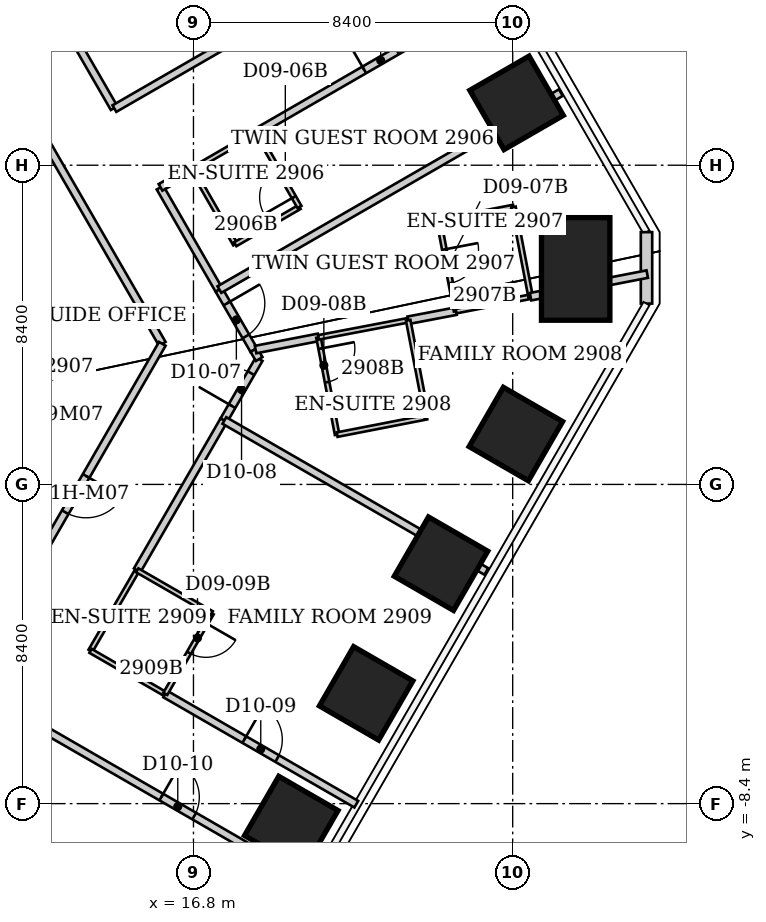
"""IFC4 building model, lengths in metres.
Left out: names, types, materials, properties, quantities, classifications, styles, units other than length and angle.
Written with IfcOpenShell. Run it as: python <this file> out.ifc"""

import sys

from ifc_helpers import new_model, si_unit, direction, frame, frame_2d, origin, origin_2d, place, context, subcontext, project, spatial, rectangle, extrude, element, fill, save


model = new_model("IFC4")
c1 = context("Model", 3, precision=1e-05, world=origin(), true_north=direction((0.0, 1.0)))
c2 = subcontext(c1, "Body", "Model", "MODEL_VIEW")
j1 = project(units=[si_unit("LENGTHUNIT", "METRE"), si_unit("PLANEANGLEUNIT", "RADIAN")], contexts=[c1])
p1 = place(None, origin())
s1 = spatial("IfcSite", under=j1, at=p1, CompositionType="ELEMENT")
p2 = place(p1, origin())
s2 = spatial("IfcBuilding", under=s1, at=p2, CompositionType="ELEMENT")
p3 = place(p2, frame((0.0, 0.0, 119.6)))
s3 = spatial("IfcBuildingStorey", under=s2, at=p3, CompositionType="ELEMENT", Elevation=119.6)
p4 = place(p3, frame((25.302, 10.041, 0.0), z_axis=(0.0, 0.0, 1.0), x_axis=(0.866025403784, 0.5, 0.0)))
e1 = element("IfcColumn", 1, at=p4, inside=s3, PredefinedType="COLUMN", context=c2, shape_type="SweptSolid", body=[
    extrude(rectangle(XDim=1.8, YDim=1.8, at=origin_2d()), origin(), (0.0, 0.0, 1.0), 3.8),
])
p5 = place(p3, frame((26.857, 5.67, 0.0), z_axis=(0.0, 0.0, 1.0), x_axis=(1.0, 0.0, 0.0)))
e2 = element("IfcColumn", 2, at=p5, inside=s3, PredefinedType="COLUMN", context=c2, shape_type="SweptSolid", body=[
    extrude(rectangle(XDim=1.8, YDim=2.7, at=origin_2d()), origin(), (0.0, 0.0, 1.0), 3.8),
])
for number, where, z_axis, x_axis in (
    (3, (25.284, 1.325, 0.0), (0.0, 0.0, 1.0), (0.866, -0.5, 0.0)),
    (4, (23.314, -2.087, 0.0), (0.0, 0.0, 1.0), (0.866, -0.5, 0.0)),
    (5, (21.344, -5.499, 0.0), (0.0, 0.0, 1.0), (0.866, -0.5, 0.0)),
    (6, (19.374, -8.911, 0.0), (0.0, 0.0, 1.0), (0.866, -0.5, 0.0)),
):
    element("IfcColumn", number, at=place(p3, frame(where, z_axis=z_axis, x_axis=x_axis)), inside=s3, PredefinedType="COLUMN", context=c2, shape_type="SweptSolid", body=[
        extrude(rectangle(XDim=1.8, YDim=1.8, at=origin_2d()), origin(), (0.0, 0.0, 1.0), 3.8),
    ])
p6 = place(p3, frame((28.721, 6.638, 0.0), z_axis=(0.0, 0.0, 1.0), x_axis=(0.0, -1.0, 0.0)))
e7 = element("IfcWall", 7, at=p6, inside=s3, PredefinedType="SOLIDWALL", context=c2, shape_type="SweptSolid", body=[
    extrude(rectangle(XDim=1.88, YDim=0.3, at=frame_2d((0.94, 0.0))), origin(), (0.0, 0.0, 1.0), 3.64),
])
p7 = place(p3, frame((11.77, 10.99, 0.0), z_axis=(0.0, 0.0, 1.0), x_axis=(0.500093981358, -0.865971136822, 0.0)))
e8 = element("IfcWall", 8, at=p7, inside=s3, PredefinedType="PARTITIONING", context=c2, shape_type="SweptSolid", body=[
    extrude(rectangle(XDim=8.418, YDim=0.2, at=frame_2d((4.209, 0.0))), origin(), (0.0, 0.0, 1.0), 3.64),
])
p8 = place(p3, frame((12.89, -6.46, 0.0), z_axis=(0.0, 0.0, 1.0), x_axis=(0.866181559118, -0.499729433437, 0.0)))
e9 = element("IfcWall", 9, at=p8, inside=s3, PredefinedType="PARTITIONING", context=c2, shape_type="SweptSolid", body=[
    extrude(rectangle(XDim=8.075, YDim=0.2, at=frame_2d((4.037, 0.0))), origin(), (0.0, 0.0, 1.0), 3.64),
])
p9 = place(p8, frame((3.537, 0.0, 0.0)))
e10 = element("IfcOpeningElement", 10, at=p9, cuts=e9, PredefinedType="OPENING", context=c2, shape_type="SweptSolid", body=[
    extrude(rectangle(XDim=1.0, YDim=2.13, at=frame_2d((0.5, 1.065))), frame((0.0, 0.1, 0.0), z_axis=(0.0, -1.0, 0.0), x_axis=(1.0, 0.0, 0.0)), (0.0, 0.0, 1.0), 0.2),
])
p10 = place(p3, frame((13.005, 12.86, 0.0), z_axis=(0.0, 0.0, 1.0), x_axis=(0.500007161152, -0.866021269252, 0.0)))
e11 = element("IfcWall", 11, at=p10, inside=s3, PredefinedType="PARTITIONING", context=c2, shape_type="SweptSolid", body=[
    extrude(rectangle(XDim=3.415, YDim=0.2, at=frame_2d((1.707, 0.0))), origin(), (0.0, 0.0, 1.0), 3.64),
])
p11 = place(p3, frame((14.09, -4.38, 0.0), z_axis=(0.0, 0.0, 1.0), x_axis=(0.501856726365, 0.86495076519, 0.0)))
e12 = element("IfcWall", 12, at=p11, inside=s3, PredefinedType="PARTITIONING", context=c2, shape_type="SweptSolid", body=[
    extrude(rectangle(XDim=2.451, YDim=0.12, at=frame_2d((1.226, 0.0))), origin(), (0.0, 0.0, 1.0), 3.64),
])
p12 = place(p3, frame((14.09, -4.38, 0.0), z_axis=(0.0, 0.0, 1.0), x_axis=(0.866151579213, -0.499781394038, 0.0)))
e13 = element("IfcWall", 13, at=p12, inside=s3, PredefinedType="PARTITIONING", context=c2, shape_type="SweptSolid", body=[
    extrude(rectangle(XDim=2.271, YDim=0.12, at=frame_2d((1.135, 0.0))), origin(), (0.0, 0.0, 1.0), 3.64),
])
p13 = place(p3, frame((15.32, -2.26, 0.0), z_axis=(0.0, 0.0, 1.0), x_axis=(0.499921709333, 0.866070600204, 0.0)))
e14 = element("IfcWall", 14, at=p13, inside=s3, PredefinedType="PARTITIONING", context=c2, shape_type="SweptSolid", body=[
    extrude(rectangle(XDim=4.561, YDim=0.2, at=frame_2d((2.28, 0.0))), origin(), (0.0, 0.0, 1.0), 3.64),
])
p14 = place(p3, frame((15.92, 7.81, 0.0), z_axis=(0.0, 0.0, 1.0), x_axis=(0.499277611559, -0.866442073422, 0.0)))
e15 = element("IfcWall", 15, at=p14, inside=s3, PredefinedType="PARTITIONING", context=c2, shape_type="SweptSolid", body=[
    extrude(rectangle(XDim=3.104, YDim=0.2, at=frame_2d((1.552, 0.0))), origin(), (0.0, 0.0, 1.0), 3.64),
])
p15 = place(p3, frame((15.933, 7.817, 0.0), z_axis=(0.0, 0.0, 1.0), x_axis=(0.870733094426, 0.491755913305, 0.0)))
e16 = element("IfcWall", 16, at=p15, inside=s3, PredefinedType="PARTITIONING", context=c2, shape_type="SweptSolid", body=[
    extrude(rectangle(XDim=0.961, YDim=0.2, at=frame_2d((0.48, 0.0))), origin(), (0.0, 0.0, 1.0), 3.64),
])
p16 = place(p3, frame((15.98, 3.7, 0.0), z_axis=(0.0, 0.0, 1.0), x_axis=(-0.499446957289, -0.866344467781, 0.0)))
e17 = element("IfcWall", 17, at=p16, inside=s3, PredefinedType="PARTITIONING", context=c2, shape_type="SweptSolid", body=[
    extrude(rectangle(XDim=9.13, YDim=0.2, at=frame_2d((4.565, 0.0))), origin(), (0.0, 0.0, 1.0), 3.64),
])
p17 = place(p16, frame((4.015, 0.0, 0.0)))
e18 = element("IfcOpeningElement", 18, at=p17, cuts=e17, PredefinedType="OPENING", context=c2, shape_type="SweptSolid", body=[
    extrude(rectangle(XDim=1.1, YDim=2.2, at=frame_2d((0.55, 1.1))), frame((0.0, 0.1, 0.0), z_axis=(0.0, -1.0, 0.0), x_axis=(1.0, 0.0, 0.0)), (0.0, 0.0, 1.0), 0.2),
])
p18 = place(p3, frame((16.057, -5.515, 0.0), z_axis=(0.0, 0.0, 1.0), x_axis=(0.866182784606, -0.499727309292, 0.0)))
e19 = element("IfcWall", 19, at=p18, inside=s3, PredefinedType="PARTITIONING", context=c2, shape_type="SweptSolid", body=[
    extrude(rectangle(XDim=5.803, YDim=0.2, at=frame_2d((2.902, 0.0))), origin(), (0.0, 0.0, 1.0), 3.64),
])
p19 = place(p18, frame((2.402, 0.0, 0.0)))
e20 = element("IfcOpeningElement", 20, at=p19, cuts=e19, PredefinedType="OPENING", context=c2, shape_type="SweptSolid", body=[
    extrude(rectangle(XDim=1.0, YDim=2.13, at=frame_2d((0.5, 1.065))), frame((0.0, 0.1, 0.0), z_axis=(0.0, -1.0, 0.0), x_axis=(1.0, 0.0, 0.0)), (0.0, 0.0, 1.0), 0.2),
])
p20 = place(p3, frame((16.06, -5.51, 0.0), z_axis=(0.0, 0.0, 1.0), x_axis=(0.498748634132, 0.866746675766, 0.0)))
e21 = element("IfcWall", 21, at=p20, inside=s3, PredefinedType="PARTITIONING", context=c2, shape_type="SweptSolid", body=[
    extrude(rectangle(XDim=2.446, YDim=0.12, at=frame_2d((1.223, 0.0))), origin(), (0.0, 0.0, 1.0), 3.64),
])
p21 = place(p20, frame((1.246, 0.0, 0.0)))
e22 = element("IfcOpeningElement", 22, at=p21, cuts=e21, PredefinedType="OPENING", context=c2, shape_type="SweptSolid", body=[
    extrude(rectangle(XDim=0.9, YDim=2.03, at=frame_2d((0.45, 1.015))), frame((0.0, 0.06, 0.0), z_axis=(0.0, -1.0, 0.0), x_axis=(1.0, 0.0, 0.0)), (0.0, 0.0, 1.0), 0.12),
])
p22 = place(p3, frame((16.77, 8.29, 0.0), z_axis=(0.0, 0.0, 1.0), x_axis=(0.497527583083, -0.867448156417, 0.0)))
e23 = element("IfcWall", 23, at=p22, inside=s3, PredefinedType="PARTITIONING", context=c2, shape_type="SweptSolid", body=[
    extrude(rectangle(XDim=2.271, YDim=0.12, at=frame_2d((1.135, 0.0))), origin(), (0.0, 0.0, 1.0), 3.64),
])
p23 = place(p3, frame((16.77, 8.29, 0.0), z_axis=(0.0, 0.0, 1.0), x_axis=(0.86507240805, 0.501647016168, 0.0)))
e24 = element("IfcWall", 24, at=p23, inside=s3, PredefinedType="PARTITIONING", context=c2, shape_type="SweptSolid", body=[
    extrude(rectangle(XDim=1.954, YDim=0.12, at=frame_2d((0.977, 0.0))), origin(), (0.0, 0.0, 1.0), 3.64),
])
p24 = place(p3, frame((17.28, -3.39, 0.0), z_axis=(0.0, 0.0, 1.0), x_axis=(-0.86635082644, 0.49943592735, 0.0)))
e25 = element("IfcWall", 25, at=p24, inside=s3, PredefinedType="PARTITIONING", context=c2, shape_type="SweptSolid", body=[
    extrude(rectangle(XDim=2.262, YDim=0.12, at=frame_2d((1.131, 0.0))), origin(), (0.0, 0.0, 1.0), 3.64),
])
p25 = place(p3, frame((17.47, 5.12, 0.0), z_axis=(0.0, 0.0, 1.0), x_axis=(0.501536229379, -0.865136642745, 0.0)))
e26 = element("IfcWall", 26, at=p25, inside=s3, PredefinedType="PARTITIONING", context=c2, shape_type="SweptSolid", body=[
    extrude(rectangle(XDim=1.828, YDim=0.2, at=frame_2d((0.914, 0.0))), origin(), (0.0, 0.0, 1.0), 3.64),
])
p26 = place(p25, frame((0.414, 0.0, 0.0)))
e27 = element("IfcOpeningElement", 27, at=p26, cuts=e26, PredefinedType="OPENING", context=c2, shape_type="SweptSolid", body=[
    extrude(rectangle(XDim=1.0, YDim=2.13, at=frame_2d((0.5, 1.065))), frame((0.0, 0.1, 0.0), z_axis=(0.0, -1.0, 0.0), x_axis=(1.0, 0.0, 0.0)), (0.0, 0.0, 1.0), 0.2),
])
p27 = place(p3, frame((17.6, 1.69, 0.0), z_axis=(0.0, 0.0, 1.0), x_axis=(0.50013539823, 0.865947217466, 0.0)))
e28 = element("IfcWall", 28, at=p27, inside=s3, PredefinedType="PARTITIONING", context=c2, shape_type="SweptSolid", body=[
    extrude(rectangle(XDim=1.859, YDim=0.2, at=frame_2d((0.93, 0.0))), origin(), (0.0, 0.0, 1.0), 3.64),
])
p28 = place(p27, frame((0.43, 0.0, 0.0)))
e29 = element("IfcOpeningElement", 29, at=p28, cuts=e28, PredefinedType="OPENING", context=c2, shape_type="SweptSolid", body=[
    extrude(rectangle(XDim=1.0, YDim=2.13, at=frame_2d((0.5, 1.065))), frame((0.0, 0.1, 0.0), z_axis=(0.0, -1.0, 0.0), x_axis=(1.0, 0.0, 0.0)), (0.0, 0.0, 1.0), 0.2),
])
p29 = place(p3, frame((17.9, 6.32, 0.0), z_axis=(0.0, 0.0, 1.0), x_axis=(0.865103852711, 0.501592787055, 0.0)))
e30 = element("IfcWall", 30, at=p29, inside=s3, PredefinedType="PARTITIONING", context=c2, shape_type="SweptSolid", body=[
    extrude(rectangle(XDim=1.954, YDim=0.12, at=frame_2d((0.977, 0.0))), origin(), (0.0, 0.0, 1.0), 3.64),
])
p30 = place(p3, frame((18.387, 3.538, 0.0), z_axis=(0.0, 0.0, 1.0), x_axis=(0.514754090884, -0.857337871506, 0.0)))
e31 = element("IfcWall", 31, at=p30, inside=s3, PredefinedType="PARTITIONING", context=c2, shape_type="SweptSolid", body=[
    extrude(rectangle(XDim=0.278, YDim=0.2, at=frame_2d((0.139, 0.0))), origin(), (0.0, 0.0, 1.0), 3.64),
])
p31 = place(p3, frame((18.434, 3.549, 0.0), z_axis=(0.0, 0.0, 1.0), x_axis=(0.981694395029, 0.190462896043, 0.0)))
e32 = element("IfcWall", 32, at=p31, inside=s3, PredefinedType="PARTITIONING", context=c2, shape_type="SweptSolid", body=[
    extrude(rectangle(XDim=1.687, YDim=0.2, at=frame_2d((0.843, 0.0))), origin(), (0.0, 0.0, 1.0), 3.64),
])
p32 = place(p3, frame((18.46, 9.27, 0.0), z_axis=(0.0, 0.0, 1.0), x_axis=(0.865880021885, 0.500251724335, 0.0)))
e33 = element("IfcWall", 33, at=p32, inside=s3, PredefinedType="PARTITIONING", context=c2, shape_type="SweptSolid", body=[
    extrude(rectangle(XDim=7.546, YDim=0.2, at=frame_2d((3.773, 0.0))), origin(), (0.0, 0.0, 1.0), 3.64),
])
p33 = place(p32, frame((3.273, 0.0, 0.0)))
e34 = element("IfcOpeningElement", 34, at=p33, cuts=e33, PredefinedType="OPENING", context=c2, shape_type="SweptSolid", body=[
    extrude(rectangle(XDim=1.0, YDim=2.13, at=frame_2d((0.5, 1.065))), frame((0.0, 0.1, 0.0), z_axis=(0.0, -1.0, 0.0), x_axis=(1.0, 0.0, 0.0)), (0.0, 0.0, 1.0), 0.2),
])
p34 = place(p3, frame((19.59, 7.3, 0.0), z_axis=(0.0, 0.0, 1.0), x_axis=(-0.49760846958, 0.867401758704, 0.0)))
e35 = element("IfcWall", 35, at=p34, inside=s3, PredefinedType="PARTITIONING", context=c2, shape_type="SweptSolid", body=[
    extrude(rectangle(XDim=2.271, YDim=0.12, at=frame_2d((1.135, 0.0))), origin(), (0.0, 0.0, 1.0), 3.64),
])
p35 = place(p34, frame((0.3, 0.0, 0.0)))
e36 = element("IfcOpeningElement", 36, at=p35, cuts=e35, PredefinedType="OPENING", context=c2, shape_type="SweptSolid", body=[
    extrude(rectangle(XDim=0.9, YDim=2.03, at=frame_2d((0.45, 1.015))), frame((0.0, 0.06, 0.0), z_axis=(0.0, -1.0, 0.0), x_axis=(1.0, 0.0, 0.0)), (0.0, 0.0, 1.0), 0.12),
])
p36 = place(p3, frame((20.09, 3.87, 0.0), z_axis=(0.0, 0.0, 1.0), x_axis=(0.187985762814, -0.982171753299, 0.0)))
e37 = element("IfcWall", 37, at=p36, inside=s3, PredefinedType="PARTITIONING", context=c2, shape_type="SweptSolid", body=[
    extrude(rectangle(XDim=2.606, YDim=0.12, at=frame_2d((1.303, 0.0))), origin(), (0.0, 0.0, 1.0), 3.64),
])
p37 = place(p36, frame((0.3, 0.0, 0.0)))
e38 = element("IfcOpeningElement", 38, at=p37, cuts=e37, PredefinedType="OPENING", context=c2, shape_type="SweptSolid", body=[
    extrude(rectangle(XDim=0.9, YDim=2.03, at=frame_2d((0.45, 1.015))), frame((0.0, 0.06, 0.0), z_axis=(0.0, -1.0, 0.0), x_axis=(1.0, 0.0, 0.0)), (0.0, 0.0, 1.0), 0.12),
])
p38 = place(p3, frame((20.09, 3.87, 0.0), z_axis=(0.0, 0.0, 1.0), x_axis=(0.982303859288, 0.187294228499, 0.0)))
e39 = element("IfcWall", 39, at=p38, inside=s3, PredefinedType="PARTITIONING", context=c2, shape_type="SweptSolid", body=[
    extrude(rectangle(XDim=2.402, YDim=0.12, at=frame_2d((1.201, 0.0))), origin(), (0.0, 0.0, 1.0), 3.64),
])
p39 = place(p3, frame((20.58, 1.31, 0.0), z_axis=(0.0, 0.0, 1.0), x_axis=(0.981529676402, 0.191309943135, 0.0)))
e40 = element("IfcWall", 40, at=p39, inside=s3, PredefinedType="PARTITIONING", context=c2, shape_type="SweptSolid", body=[
    extrude(rectangle(XDim=2.404, YDim=0.12, at=frame_2d((1.202, 0.0))), origin(), (0.0, 0.0, 1.0), 3.64),
])
p40 = place(p3, frame((22.45, 4.32, 0.0), z_axis=(0.0, 0.0, 1.0), x_axis=(0.982340232372, 0.187103361446, 0.0)))
e41 = element("IfcWall", 41, at=p40, inside=s3, PredefinedType="PARTITIONING", context=c2, shape_type="SweptSolid", body=[
    extrude(rectangle(XDim=1.283, YDim=0.2, at=frame_2d((0.641, 0.0))), origin(), (0.0, 0.0, 1.0), 3.64),
])
p41 = place(p3, frame((22.94, 1.77, 0.0), z_axis=(0.0, 0.0, 1.0), x_axis=(-0.188697442844, 0.982035271802, 0.0)))
e42 = element("IfcWall", 42, at=p41, inside=s3, PredefinedType="PARTITIONING", context=c2, shape_type="SweptSolid", body=[
    extrude(rectangle(XDim=2.597, YDim=0.12, at=frame_2d((1.298, 0.0))), origin(), (0.0, 0.0, 1.0), 3.64),
])
p42 = place(p3, frame((23.26, 6.92, 0.0), z_axis=(0.0, 0.0, 1.0), x_axis=(0.187294228499, -0.982303859288, 0.0)))
e43 = element("IfcWall", 43, at=p42, inside=s3, PredefinedType="PARTITIONING", context=c2, shape_type="SweptSolid", body=[
    extrude(rectangle(XDim=2.402, YDim=0.12, at=frame_2d((1.201, 0.0))), origin(), (0.0, 0.0, 1.0), 3.64),
])
p43 = place(p42, frame((0.75, 0.0, 0.0)))
e44 = element("IfcOpeningElement", 44, at=p43, cuts=e43, PredefinedType="OPENING", context=c2, shape_type="SweptSolid", body=[
    extrude(rectangle(XDim=0.9, YDim=2.03, at=frame_2d((0.45, 1.015))), frame((0.0, 0.06, 0.0), z_axis=(0.0, -1.0, 0.0), x_axis=(1.0, 0.0, 0.0)), (0.0, 0.0, 1.0), 0.12),
])
p44 = place(p3, frame((23.71, 4.56, 0.0), z_axis=(0.0, 0.0, 1.0), x_axis=(0.981729772821, 0.190280459207, 0.0)))
e45 = element("IfcWall", 45, at=p44, inside=s3, PredefinedType="PARTITIONING", context=c2, shape_type="SweptSolid", body=[
    extrude(rectangle(XDim=1.996, YDim=0.12, at=frame_2d((0.998, 0.0))), origin(), (0.0, 0.0, 1.0), 3.64),
])
p45 = place(p3, frame((23.794, 15.125, 0.0), z_axis=(0.0, 0.0, 1.0), x_axis=(-0.866190629897, -0.499713710718, 0.0)))
e46 = element("IfcWall", 46, at=p45, inside=s3, PredefinedType="PARTITIONING", context=c2, shape_type="SweptSolid", body=[
    extrude(rectangle(XDim=10.476, YDim=0.2, at=frame_2d((5.238, 0.0))), origin(), (0.0, 0.0, 1.0), 3.64),
])
p46 = place(p45, frame((4.738, 0.0, 0.0)))
e47 = element("IfcOpeningElement", 47, at=p46, cuts=e46, PredefinedType="OPENING", context=c2, shape_type="SweptSolid", body=[
    extrude(rectangle(XDim=1.0, YDim=2.13, at=frame_2d((0.5, 1.065))), frame((0.0, 0.1, 0.0), z_axis=(0.0, -1.0, 0.0), x_axis=(1.0, 0.0, 0.0)), (0.0, 0.0, 1.0), 0.2),
])
p47 = place(p3, frame((24.506, -2.29, 0.0), z_axis=(0.0, 0.0, 1.0), x_axis=(-0.866422539587, 0.499311508876, 0.0)))
e48 = element("IfcWall", 48, at=p47, inside=s3, PredefinedType="PARTITIONING", context=c2, shape_type="SweptSolid", body=[
    extrude(rectangle(XDim=7.956, YDim=0.2, at=frame_2d((3.978, 0.0))), origin(), (0.0, 0.0, 1.0), 3.64),
])
p48 = place(p3, frame((25.22, 7.3, 0.0), z_axis=(0.0, 0.0, 1.0), x_axis=(-0.981706922352, -0.190398315658, 0.0)))
e49 = element("IfcWall", 49, at=p48, inside=s3, PredefinedType="PARTITIONING", context=c2, shape_type="SweptSolid", body=[
    extrude(rectangle(XDim=1.997, YDim=0.12, at=frame_2d((0.998, 0.0))), origin(), (0.0, 0.0, 1.0), 3.64),
])
p49 = place(p3, frame((25.67, 4.94, 0.0), z_axis=(0.0, 0.0, 1.0), x_axis=(-0.187275533444, 0.982307423658, 0.0)))
e50 = element("IfcWall", 50, at=p49, inside=s3, PredefinedType="PARTITIONING", context=c2, shape_type="SweptSolid", body=[
    extrude(rectangle(XDim=2.403, YDim=0.12, at=frame_2d((1.201, 0.0))), origin(), (0.0, 0.0, 1.0), 3.64),
])
p50 = place(p3, frame((25.67, 4.94, 0.0), z_axis=(0.0, 0.0, 1.0), x_axis=(0.981783608641, 0.190002488943, 0.0)))
e51 = element("IfcWall", 51, at=p50, inside=s3, PredefinedType="PARTITIONING", context=c2, shape_type="SweptSolid", body=[
    extrude(rectangle(XDim=3.127, YDim=0.2, at=frame_2d((1.564, 0.0))), origin(), (0.0, 0.0, 1.0), 3.64),
])
p51 = place(p3, frame((26.466, 10.31, 0.0), z_axis=(0.0, 0.0, 1.0), x_axis=(-0.866184410312, -0.499724491428, 0.0)))
e52 = element("IfcWall", 52, at=p51, inside=s3, PredefinedType="PARTITIONING", context=c2, shape_type="SweptSolid", body=[
    extrude(rectangle(XDim=10.371, YDim=0.2, at=frame_2d((5.186, 0.0))), origin(), (0.0, 0.0, 1.0), 3.64),
])
p52 = place(p33, origin())
e53 = element("IfcDoor", 53, at=p52, inside=s3, OperationType="SINGLE_SWING_LEFT", PredefinedType="DOOR", context=c2, shape_type="SweptSolid", body=[
    extrude(rectangle(XDim=1.0, YDim=2.13, at=frame_2d((0.5, 1.065))), frame((0.0, 0.025, 0.0), z_axis=(0.0, -1.0, 0.0), x_axis=(1.0, 0.0, 0.0)), (0.0, 0.0, 1.0), 0.05),
])
fill(e34, e53)
p53 = place(p35, origin())
e54 = element("IfcDoor", 54, at=p53, inside=s3, OperationType="SINGLE_SWING_LEFT", PredefinedType="DOOR", context=c2, shape_type="SweptSolid", body=[
    extrude(rectangle(XDim=0.9, YDim=2.03, at=frame_2d((0.45, 1.015))), frame((0.0, 0.025, 0.0), z_axis=(0.0, -1.0, 0.0), x_axis=(1.0, 0.0, 0.0)), (0.0, 0.0, 1.0), 0.05),
])
fill(e36, e54)
p54 = place(p26, origin())
e55 = element("IfcDoor", 55, at=p54, inside=s3, OperationType="SINGLE_SWING_LEFT", PredefinedType="DOOR", context=c2, shape_type="SweptSolid", body=[
    extrude(rectangle(XDim=1.0, YDim=2.13, at=frame_2d((0.5, 1.065))), frame((0.0, 0.025, 0.0), z_axis=(0.0, -1.0, 0.0), x_axis=(1.0, 0.0, 0.0)), (0.0, 0.0, 1.0), 0.05),
])
fill(e27, e55)
p55 = place(p43, origin())
e56 = element("IfcDoor", 56, at=p55, inside=s3, OperationType="SINGLE_SWING_LEFT", PredefinedType="DOOR", context=c2, shape_type="SweptSolid", body=[
    extrude(rectangle(XDim=0.9, YDim=2.03, at=frame_2d((0.45, 1.015))), frame((0.0, 0.025, 0.0), z_axis=(0.0, -1.0, 0.0), x_axis=(1.0, 0.0, 0.0)), (0.0, 0.0, 1.0), 0.05),
])
fill(e44, e56)
p56 = place(p28, origin())
e57 = element("IfcDoor", 57, at=p56, inside=s3, OperationType="SINGLE_SWING_LEFT", PredefinedType="DOOR", context=c2, shape_type="SweptSolid", body=[
    extrude(rectangle(XDim=1.0, YDim=2.13, at=frame_2d((0.5, 1.065))), frame((0.0, 0.025, 0.0), z_axis=(0.0, -1.0, 0.0), x_axis=(1.0, 0.0, 0.0)), (0.0, 0.0, 1.0), 0.05),
])
fill(e29, e57)
p57 = place(p37, origin())
e58 = element("IfcDoor", 58, at=p57, inside=s3, OperationType="SINGLE_SWING_LEFT", PredefinedType="DOOR", context=c2, shape_type="SweptSolid", body=[
    extrude(rectangle(XDim=0.9, YDim=2.03, at=frame_2d((0.45, 1.015))), frame((0.0, 0.025, 0.0), z_axis=(0.0, -1.0, 0.0), x_axis=(1.0, 0.0, 0.0)), (0.0, 0.0, 1.0), 0.05),
])
fill(e38, e58)
p58 = place(p19, origin())
e59 = element("IfcDoor", 59, at=p58, inside=s3, OperationType="SINGLE_SWING_LEFT", PredefinedType="DOOR", context=c2, shape_type="SweptSolid", body=[
    extrude(rectangle(XDim=1.0, YDim=2.13, at=frame_2d((0.5, 1.065))), frame((0.0, 0.025, 0.0), z_axis=(0.0, -1.0, 0.0), x_axis=(1.0, 0.0, 0.0)), (0.0, 0.0, 1.0), 0.05),
])
fill(e20, e59)
p59 = place(p21, origin())
e60 = element("IfcDoor", 60, at=p59, inside=s3, OperationType="SINGLE_SWING_RIGHT", PredefinedType="DOOR", context=c2, shape_type="SweptSolid", body=[
    extrude(rectangle(XDim=0.9, YDim=2.03, at=frame_2d((0.45, 1.015))), frame((0.0, 0.025, 0.0), z_axis=(0.0, -1.0, 0.0), x_axis=(1.0, 0.0, 0.0)), (0.0, 0.0, 1.0), 0.05),
])
fill(e22, e60)
p60 = place(p9, origin())
e61 = element("IfcDoor", 61, at=p60, inside=s3, OperationType="SINGLE_SWING_LEFT", PredefinedType="DOOR", context=c2, shape_type="SweptSolid", body=[
    extrude(rectangle(XDim=1.0, YDim=2.13, at=frame_2d((0.5, 1.065))), frame((0.0, 0.025, 0.0), z_axis=(0.0, -1.0, 0.0), x_axis=(1.0, 0.0, 0.0)), (0.0, 0.0, 1.0), 0.05),
])
fill(e10, e61)
p61 = place(p17, origin())
e62 = element("IfcDoor", 62, at=p61, inside=s3, OperationType="SINGLE_SWING_LEFT", PredefinedType="DOOR", context=c2, shape_type="SweptSolid", body=[
    extrude(rectangle(XDim=1.1, YDim=2.2, at=frame_2d((0.55, 1.1))), frame((0.0, 0.025, 0.0), z_axis=(0.0, -1.0, 0.0), x_axis=(1.0, 0.0, 0.0)), (0.0, 0.0, 1.0), 0.05),
])
fill(e18, e62)
save(model, sys.argv[1])
